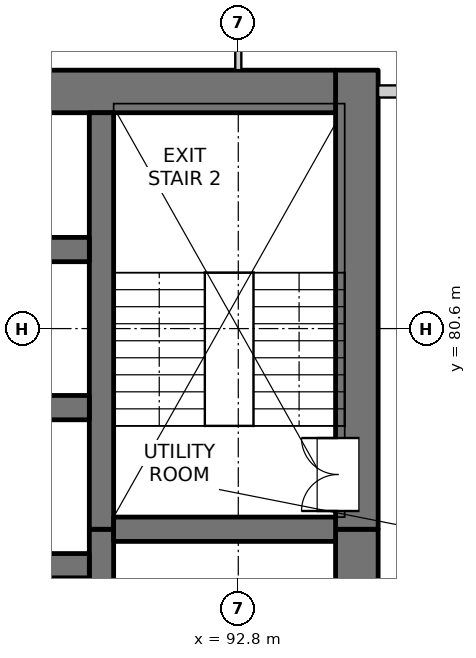
"""IFC4 building model, lengths in metres.
Left out: names, types, materials, properties, quantities, classifications, styles, units other than length and angle.
Written with IfcOpenShell. Run it as: python <this file> out.ifc"""

import sys

from ifc_helpers import new_model, si_unit, direction, frame, frame_2d, origin, place, context, subcontext, project, spatial, rectangle, extrude, element, fill, save


model = new_model("IFC4")
c1 = context("Model", 3, precision=1e-05, world=origin(), true_north=direction((0.0, 1.0)))
c2 = subcontext(c1, "Body", "Model", "MODEL_VIEW")
j1 = project(units=[si_unit("LENGTHUNIT", "METRE"), si_unit("PLANEANGLEUNIT", "RADIAN")], contexts=[c1])
p1 = place(None, origin())
s1 = spatial("IfcSite", under=j1, at=p1, CompositionType="ELEMENT")
p2 = place(p1, origin())
s2 = spatial("IfcBuilding", under=s1, at=p2, CompositionType="ELEMENT")
p3 = place(p2, frame((0.0, 0.0, 58.0)))
s3 = spatial("IfcBuildingStorey", under=s2, at=p3, CompositionType="ELEMENT", Elevation=58.0)
p4 = place(p3, frame((94.75, 61.95, -0.25), z_axis=(0.0, 0.0, 1.0), x_axis=(0.0, 1.0, 0.0)))
e1 = element("IfcWall", 1, at=p4, inside=s3, PredefinedType="SOLIDWALL", context=c2, shape_type="SweptSolid", body=[
    extrude(rectangle(XDim=15.35, YDim=0.7, at=frame_2d((7.675, 0.0))), origin(), (0.0, 0.0, 1.0), 3.4),
])
p5 = place(p4, frame((0.925, 0.0, 0.25)))
e2 = element("IfcOpeningElement", 2, at=p5, cuts=e1, PredefinedType="OPENING", context=c2, shape_type="SweptSolid", body=[
    extrude(rectangle(XDim=0.9, YDim=2.1, at=frame_2d((0.45, 1.05))), frame((0.0, 0.36, 0.0), z_axis=(0.0, -1.0, 0.0), x_axis=(1.0, 0.0, 0.0)), (0.0, 0.0, 1.0), 0.72),
])
p6 = place(p4, frame((5.15, 0.0, 0.25)))
e3 = element("IfcOpeningElement", 3, at=p6, cuts=e1, PredefinedType="OPENING", context=c2, shape_type="SweptSolid", body=[
    extrude(rectangle(XDim=0.9, YDim=2.1, at=frame_2d((0.45, 1.05))), frame((0.0, 0.36, 0.0), z_axis=(0.0, -1.0, 0.0), x_axis=(1.0, 0.0, 0.0)), (0.0, 0.0, 1.0), 0.72),
])
p7 = place(p4, frame((9.65, 0.0, 0.25)))
e4 = element("IfcOpeningElement", 4, at=p7, cuts=e1, PredefinedType="OPENING", context=c2, shape_type="SweptSolid", body=[
    extrude(rectangle(XDim=0.9, YDim=2.1, at=frame_2d((0.45, 1.05))), frame((0.0, 0.36, 0.0), z_axis=(0.0, -1.0, 0.0), x_axis=(1.0, 0.0, 0.0)), (0.0, 0.0, 1.0), 0.72),
])
p8 = place(p4, frame((13.1, 0.0, 0.25)))
e5 = element("IfcOpeningElement", 5, at=p8, cuts=e1, PredefinedType="OPENING", context=c2, shape_type="SweptSolid", body=[
    extrude(rectangle(XDim=0.9, YDim=2.1, at=frame_2d((0.45, 1.05))), frame((0.0, 0.36, 0.0), z_axis=(0.0, -1.0, 0.0), x_axis=(1.0, 0.0, 0.0)), (0.0, 0.0, 1.0), 0.72),
])
p9 = place(p3, frame((94.75, 77.3, -0.25), z_axis=(0.0, 0.0, 1.0), x_axis=(0.0, 1.0, 0.0)))
e6 = element("IfcWall", 6, at=p9, inside=s3, PredefinedType="SOLIDWALL", context=c2, shape_type="SweptSolid", body=[
    extrude(rectangle(XDim=7.55, YDim=0.7, at=frame_2d((3.775, 0.0))), origin(), (0.0, 0.0, 1.0), 3.4),
])
p10 = place(p9, frame((0.3, 0.0, 0.25)))
e7 = element("IfcOpeningElement", 7, at=p10, cuts=e6, PredefinedType="OPENING", context=c2, shape_type="SweptSolid", body=[
    extrude(rectangle(XDim=1.2, YDim=2.1, at=frame_2d((0.6, 1.05))), frame((0.0, 0.36, 0.0), z_axis=(0.0, -1.0, 0.0), x_axis=(1.0, 0.0, 0.0)), (0.0, 0.0, 1.0), 0.72),
])
p11 = place(p3, frame((75.6, 84.5, -0.25), z_axis=(0.0, 0.0, 1.0), x_axis=(1.0, 0.0, 0.0)))
e8 = element("IfcWall", 8, at=p11, inside=s3, PredefinedType="SOLIDWALL", context=c2, shape_type="SweptSolid", body=[
    extrude(rectangle(XDim=18.8, YDim=0.7, at=frame_2d((9.4, 0.0))), origin(), (0.0, 0.0, 1.0), 3.4),
])
p12 = place(p3, frame((90.55, 61.95, -0.25), z_axis=(0.0, 0.0, 1.0), x_axis=(0.0, 1.0, 0.0)))
e9 = element("IfcWall", 9, at=p12, inside=s3, PredefinedType="SOLIDWALL", context=c2, shape_type="SweptSolid", body=[
    extrude(rectangle(XDim=15.35, YDim=0.4, at=frame_2d((7.675, 0.0))), origin(), (0.0, 0.0, 1.0), 3.4),
])
p13 = place(p3, frame((90.55, 77.3, -0.25), z_axis=(0.0, 0.0, 1.0), x_axis=(0.0, 1.0, 0.0)))
e10 = element("IfcWall", 10, at=p13, inside=s3, PredefinedType="SOLIDWALL", context=c2, shape_type="SweptSolid", body=[
    extrude(rectangle(XDim=6.85, YDim=0.4, at=frame_2d((3.425, 0.0))), origin(), (0.0, 0.0, 1.0), 3.4),
])
for number, where, z_axis, x_axis in (
    (11, (87.35, 76.7, -0.25), (0.0, 0.0, 1.0), (1.0, 0.0, 0.0)),
    (12, (87.35, 79.3, -0.25), (0.0, 0.0, 1.0), (1.0, 0.0, 0.0)),
    (13, (87.35, 81.9, -0.25), (0.0, 0.0, 1.0), (1.0, 0.0, 0.0)),
):
    element("IfcWall", number, at=place(p3, frame(where, z_axis=z_axis, x_axis=x_axis)), inside=s3, PredefinedType="SOLIDWALL", context=c2, shape_type="SweptSolid", body=[
        extrude(rectangle(XDim=3.0, YDim=0.4, at=frame_2d((1.5, 0.0))), origin(), (0.0, 0.0, 1.0), 3.4),
    ])
p14 = place(p3, frame((90.75, 77.3, -0.25), z_axis=(0.0, 0.0, 1.0), x_axis=(1.0, 0.0, 0.0)))
e14 = element("IfcWall", 14, at=p14, inside=s3, PredefinedType="SOLIDWALL", context=c2, shape_type="SweptSolid", body=[
    extrude(rectangle(XDim=3.65, YDim=0.4, at=frame_2d((1.825, 0.0))), origin(), (0.0, 0.0, 1.0), 3.4),
])
p15 = place(p3, frame((95.1, 84.5, 0.0), z_axis=(0.0, 0.0, 1.0), x_axis=(1.0, 0.0, 0.0)))
e15 = element("IfcWall", 15, at=p15, inside=s3, PredefinedType="PARTITIONING", context=c2, shape_type="SweptSolid", body=[
    extrude(rectangle(XDim=1.7, YDim=0.2, at=frame_2d((0.85, 0.0))), origin(), (0.0, 0.0, 1.0), 3.15),
])
p16 = place(p3, frame((92.8, 84.85, 0.0), z_axis=(0.0, 0.0, 1.0), x_axis=(0.0, 1.0, 0.0)))
e16 = element("IfcWall", 16, at=p16, inside=s3, PredefinedType="PARTITIONING", context=c2, shape_type="SweptSolid", body=[
    extrude(rectangle(XDim=3.25, YDim=0.1, at=frame_2d((1.625, 0.0))), origin(), (0.0, 0.0, 1.0), 3.15),
])
p17 = place(p16, frame((1.15, 0.0, 0.0)))
e17 = element("IfcOpeningElement", 17, at=p17, cuts=e16, PredefinedType="OPENING", context=c2, shape_type="SweptSolid", body=[
    extrude(rectangle(XDim=0.9, YDim=2.1, at=frame_2d((0.45, 1.05))), frame((0.0, 0.06, 0.0), z_axis=(0.0, -1.0, 0.0), x_axis=(1.0, 0.0, 0.0)), (0.0, 0.0, 1.0), 0.12),
])
p18 = place(p10, origin())
e18 = element("IfcDoor", 18, at=p18, inside=s3, OperationType="DOUBLE_DOOR_SINGLE_SWING", PredefinedType="DOOR", context=c2, shape_type="SweptSolid", body=[
    extrude(rectangle(XDim=1.2, YDim=2.1, at=frame_2d((0.6, 1.05))), frame((0.0, 0.335, 0.0), z_axis=(0.0, -1.0, 0.0), x_axis=(1.0, 0.0, 0.0)), (0.0, 0.0, 1.0), 0.05),
])
fill(e7, e18)
save(model, sys.argv[1])
